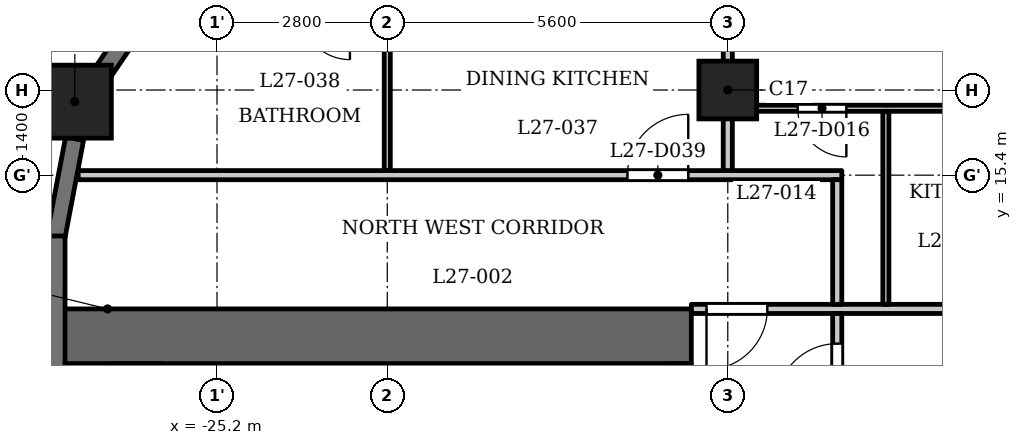
"""IFC4 building model, lengths in metres.
Left out: names, types, materials, properties, quantities, classifications, styles, units other than length and angle.
Written with IfcOpenShell. Run it as: python <this file> out.ifc"""

import sys

from ifc_helpers import new_model, si_unit, direction, frame, frame_2d, origin, origin_2d, place, context, subcontext, project, spatial, rectangle, extrude, element, fill, save


model = new_model("IFC4")
c1 = context("Model", 3, precision=1e-05, world=origin(), true_north=direction((0.0, 1.0)))
c2 = subcontext(c1, "Body", "Model", "MODEL_VIEW")
j1 = project(units=[si_unit("LENGTHUNIT", "METRE"), si_unit("PLANEANGLEUNIT", "RADIAN")], contexts=[c1])
p1 = place(None, origin())
s1 = spatial("IfcSite", under=j1, at=p1, CompositionType="ELEMENT")
p2 = place(p1, origin())
s2 = spatial("IfcBuilding", under=s1, at=p2, CompositionType="ELEMENT")
p3 = place(p2, frame((0.0, 0.0, 107.8)))
s3 = spatial("IfcBuildingStorey", under=s2, at=p3, CompositionType="ELEMENT", Elevation=107.8)
p4 = place(p3, frame((-27.538, 16.609, 0.0), z_axis=(0.0, 0.0, 1.0), x_axis=(1.0, 0.0, 0.0)))
e1 = element("IfcColumn", 1, at=p4, inside=s3, PredefinedType="COLUMN", context=c2, shape_type="SweptSolid", body=[
    extrude(rectangle(XDim=1.2, YDim=1.2, at=origin_2d()), origin(), (0.0, 0.0, 1.0), 3.5),
])
p5 = place(p3, frame((-16.8, 16.8, 0.0), z_axis=(0.0, 0.0, 1.0), x_axis=(1.0, 0.0, 0.0)))
e2 = element("IfcColumn", 2, at=p5, inside=s3, PredefinedType="COLUMN", context=c2, shape_type="SweptSolid", body=[
    extrude(rectangle(XDim=0.95, YDim=0.95, at=origin_2d()), origin(), (0.0, 0.0, 1.0), 3.5),
])
p6 = place(p3, frame((-26.561, 17.851, 0.0), z_axis=(0.0, 0.0, 1.0), x_axis=(-0.562173331661, -0.827019434577, 0.0)))
e3 = element("IfcWall", 3, at=p6, inside=s3, PredefinedType="SOLIDWALL", context=c2, shape_type="SweptSolid", body=[
    extrude(rectangle(XDim=0.977, YDim=0.3, at=frame_2d((0.489, 0.0))), origin(), (0.0, 0.0, 1.0), 3.2),
])
p7 = place(p3, frame((-27.542, 15.999, 0.0), z_axis=(0.0, 0.0, 1.0), x_axis=(-0.187349172861, -0.982293381546, 0.0)))
e4 = element("IfcWall", 4, at=p7, inside=s3, PredefinedType="SOLIDWALL", context=c2, shape_type="SweptSolid", body=[
    extrude(rectangle(XDim=1.656, YDim=0.3, at=frame_2d((0.828, 0.0))), origin(), (0.0, 0.0, 1.0), 2.4),
])
p8 = place(p3, frame((-27.85, 14.4, 0.0), z_axis=(0.0, 0.0, 1.0), x_axis=(0.0, -1.0, 0.0)))
e5 = element("IfcWall", 5, at=p8, inside=s3, PredefinedType="SOLIDWALL", context=c2, shape_type="SweptSolid", body=[
    extrude(rectangle(XDim=2.6, YDim=0.3, at=frame_2d((1.3, 0.0))), origin(), (0.0, 0.0, 1.0), 2.4),
])
p9 = place(p3, frame((-17.4, 12.75, 0.0), z_axis=(0.0, 0.0, 1.0), x_axis=(-1.0, 0.0, 0.0)))
e6 = element("IfcWall", 6, at=p9, inside=s3, PredefinedType="SHEAR", context=c2, shape_type="SweptSolid", body=[
    extrude(rectangle(XDim=10.4, YDim=0.9, at=frame_2d((5.2, 0.0))), origin(), (0.0, 0.0, 1.0), 3.2),
])
p10 = place(p3, frame((-17.6, -12.3, 0.0), z_axis=(0.0, 0.0, 1.0), x_axis=(0.0, 1.0, 0.0)))
e7 = element("IfcWall", 7, at=p10, inside=s3, PredefinedType="SHEAR", context=c2, shape_type="SweptSolid", body=[
    extrude(rectangle(XDim=24.6, YDim=0.4, at=frame_2d((12.3, 0.0))), origin(), (0.0, 0.0, 1.0), 3.2),
])
p11 = place(p10, frame((6.0, 0.0, 0.0)))
e8 = element("IfcOpeningElement", 8, at=p11, cuts=e7, PredefinedType="OPENING", context=c2, shape_type="SweptSolid", body=[
    extrude(rectangle(XDim=1.1, YDim=2.1, at=frame_2d((0.55, 1.05))), frame((0.0, 0.21, 0.0), z_axis=(0.0, -1.0, 0.0), x_axis=(1.0, 0.0, 0.0)), (0.0, 0.0, 1.0), 0.42),
])
p12 = place(p10, frame((8.4, 0.0, 0.0)))
e9 = element("IfcOpeningElement", 9, at=p12, cuts=e7, PredefinedType="OPENING", context=c2, shape_type="SweptSolid", body=[
    extrude(rectangle(XDim=1.1, YDim=2.1, at=frame_2d((0.55, 1.05))), frame((0.0, 0.21, 0.0), z_axis=(0.0, -1.0, 0.0), x_axis=(1.0, 0.0, 0.0)), (0.0, 0.0, 1.0), 0.42),
])
p13 = place(p10, frame((10.8, 0.0, 0.0)))
e10 = element("IfcOpeningElement", 10, at=p13, cuts=e7, PredefinedType="OPENING", context=c2, shape_type="SweptSolid", body=[
    extrude(rectangle(XDim=1.1, YDim=2.1, at=frame_2d((0.55, 1.05))), frame((0.0, 0.21, 0.0), z_axis=(0.0, -1.0, 0.0), x_axis=(1.0, 0.0, 0.0)), (0.0, 0.0, 1.0), 0.42),
])
p14 = place(p10, frame((16.75, 0.0, 0.0)))
e11 = element("IfcOpeningElement", 11, at=p14, cuts=e7, PredefinedType="OPENING", context=c2, shape_type="SweptSolid", body=[
    extrude(rectangle(XDim=0.9, YDim=2.1, at=frame_2d((0.45, 1.05))), frame((0.0, 0.21, 0.0), z_axis=(0.0, -1.0, 0.0), x_axis=(1.0, 0.0, 0.0)), (0.0, 0.0, 1.0), 0.42),
])
p15 = place(p10, frame((22.8, 0.0, 0.0)))
e12 = element("IfcOpeningElement", 12, at=p15, cuts=e7, PredefinedType="OPENING", context=c2, shape_type="SweptSolid", body=[
    extrude(rectangle(XDim=1.1, YDim=2.1, at=frame_2d((0.55, 1.05))), frame((0.0, 0.21, 0.0), z_axis=(0.0, -1.0, 0.0), x_axis=(1.0, 0.0, 0.0)), (0.0, 0.0, 1.0), 0.42),
])
p16 = place(p10, frame((0.7, 0.0, 0.0)))
e13 = element("IfcOpeningElement", 13, at=p16, cuts=e7, PredefinedType="OPENING", context=c2, shape_type="SweptSolid", body=[
    extrude(rectangle(XDim=1.1, YDim=2.1, at=frame_2d((0.55, 1.05))), frame((0.0, 0.21, 0.0), z_axis=(0.0, -1.0, 0.0), x_axis=(1.0, 0.0, 0.0)), (0.0, 0.0, 1.0), 0.42),
])
p17 = place(p10, frame((12.775, 0.0, 0.0)))
e14 = element("IfcOpeningElement", 14, at=p17, cuts=e7, PredefinedType="OPENING", context=c2, shape_type="SweptSolid", body=[
    extrude(rectangle(XDim=1.8, YDim=2.1, at=frame_2d((0.9, 1.05))), frame((0.0, 0.21, 0.0), z_axis=(0.0, -1.0, 0.0), x_axis=(1.0, 0.0, 0.0)), (0.0, 0.0, 1.0), 0.42),
])
p18 = place(p3, frame((-26.55, -12.3, 0.0), z_axis=(0.0, 0.0, 1.0), x_axis=(0.0, 1.0, 0.0)))
e15 = element("IfcWall", 15, at=p18, inside=s3, PredefinedType="SHEAR", context=c2, shape_type="SweptSolid", body=[
    extrude(rectangle(XDim=24.6, YDim=0.9, at=frame_2d((12.3, 0.0))), origin(), (0.0, 0.0, 1.0), 3.2),
])
p19 = place(p3, frame((-23.55, 9.8, 0.0), z_axis=(0.0, 0.0, 1.0), x_axis=(0.0, 1.0, 0.0)))
e16 = element("IfcWall", 16, at=p19, inside=s3, PredefinedType="PARTITIONING", context=c2, shape_type="SweptSolid", body=[
    extrude(rectangle(XDim=2.5, YDim=0.2, at=frame_2d((1.25, 0.0))), origin(), (0.0, 0.0, 1.0), 3.2),
])
p20 = place(p19, frame((0.8, 0.0, 0.0)))
e17 = element("IfcOpeningElement", 17, at=p20, cuts=e16, PredefinedType="OPENING", context=c2, shape_type="SweptSolid", body=[
    extrude(rectangle(XDim=0.9, YDim=2.1, at=frame_2d((0.45, 1.05))), frame((0.0, 0.11, 0.0), z_axis=(0.0, -1.0, 0.0), x_axis=(1.0, 0.0, 0.0)), (0.0, 0.0, 1.0), 0.22),
])
p21 = place(p3, frame((-17.4, 13.2, 0.0), z_axis=(0.0, 0.0, 1.0), x_axis=(1.0, 0.0, 0.0)))
e18 = element("IfcWall", 18, at=p21, inside=s3, PredefinedType="PARTITIONING", context=c2, shape_type="SweptSolid", body=[
    extrude(rectangle(XDim=34.8, YDim=0.15, at=frame_2d((17.4, 0.0))), origin(), (0.0, 0.0, 1.0), 3.2),
])
p22 = place(p21, frame((0.25, 0.0, 0.0)))
e19 = element("IfcOpeningElement", 19, at=p22, cuts=e18, PredefinedType="OPENING", context=c2, shape_type="SweptSolid", body=[
    extrude(rectangle(XDim=1.0, YDim=2.1, at=frame_2d((0.5, 1.05))), frame((0.0, 0.085, 0.0), z_axis=(0.0, -1.0, 0.0), x_axis=(1.0, 0.0, 0.0)), (0.0, 0.0, 1.0), 0.17),
])
p23 = place(p21, frame((33.65, 0.0, 0.0)))
e20 = element("IfcOpeningElement", 20, at=p23, cuts=e18, PredefinedType="OPENING", context=c2, shape_type="SweptSolid", body=[
    extrude(rectangle(XDim=1.0, YDim=2.1, at=frame_2d((0.5, 1.05))), frame((0.0, 0.085, 0.0), z_axis=(0.0, -1.0, 0.0), x_axis=(1.0, 0.0, 0.0)), (0.0, 0.0, 1.0), 0.17),
])
p24 = place(p21, frame((4.55, 0.0, 0.0)))
e21 = element("IfcOpeningElement", 21, at=p24, cuts=e18, PredefinedType="OPENING", context=c2, shape_type="SweptSolid", body=[
    extrude(rectangle(XDim=1.0, YDim=2.1, at=frame_2d((0.5, 1.05))), frame((0.0, 0.085, 0.0), z_axis=(0.0, -1.0, 0.0), x_axis=(1.0, 0.0, 0.0)), (0.0, 0.0, 1.0), 0.17),
])
p25 = place(p21, frame((6.85, 0.0, 0.0)))
e22 = element("IfcOpeningElement", 22, at=p25, cuts=e18, PredefinedType="OPENING", context=c2, shape_type="SweptSolid", body=[
    extrude(rectangle(XDim=1.0, YDim=2.1, at=frame_2d((0.5, 1.05))), frame((0.0, 0.085, 0.0), z_axis=(0.0, -1.0, 0.0), x_axis=(1.0, 0.0, 0.0)), (0.0, 0.0, 1.0), 0.17),
])
p26 = place(p21, frame((12.5, 0.0, 0.0)))
e23 = element("IfcOpeningElement", 23, at=p26, cuts=e18, PredefinedType="OPENING", context=c2, shape_type="SweptSolid", body=[
    extrude(rectangle(XDim=1.0, YDim=2.1, at=frame_2d((0.5, 1.05))), frame((0.0, 0.085, 0.0), z_axis=(0.0, -1.0, 0.0), x_axis=(1.0, 0.0, 0.0)), (0.0, 0.0, 1.0), 0.17),
])
p27 = place(p21, frame((25.7, 0.0, 0.0)))
e24 = element("IfcOpeningElement", 24, at=p27, cuts=e18, PredefinedType="OPENING", context=c2, shape_type="SweptSolid", body=[
    extrude(rectangle(XDim=1.0, YDim=2.1, at=frame_2d((0.5, 1.05))), frame((0.0, 0.085, 0.0), z_axis=(0.0, -1.0, 0.0), x_axis=(1.0, 0.0, 0.0)), (0.0, 0.0, 1.0), 0.17),
])
p28 = place(p21, frame((29.75, 0.0, 0.0)))
e25 = element("IfcOpeningElement", 25, at=p28, cuts=e18, PredefinedType="OPENING", context=c2, shape_type="SweptSolid", body=[
    extrude(rectangle(XDim=1.0, YDim=2.1, at=frame_2d((0.5, 1.05))), frame((0.0, 0.085, 0.0), z_axis=(0.0, -1.0, 0.0), x_axis=(1.0, 0.0, 0.0)), (0.0, 0.0, 1.0), 0.17),
])
p29 = place(p3, frame((-27.484, 15.4, 0.0), z_axis=(0.0, 0.0, 1.0), x_axis=(1.0, 0.0, 0.0)))
e26 = element("IfcWall", 26, at=p29, inside=s3, PredefinedType="PARTITIONING", context=c2, shape_type="SweptSolid", body=[
    extrude(rectangle(XDim=12.559, YDim=0.15, at=frame_2d((6.279, 0.0))), origin(), (0.0, 0.0, 1.0), 3.2),
])
p30 = place(p29, frame((9.034, 0.0, 0.0)))
e27 = element("IfcOpeningElement", 27, at=p30, cuts=e26, PredefinedType="OPENING", context=c2, shape_type="SweptSolid", body=[
    extrude(rectangle(XDim=1.0, YDim=2.1, at=frame_2d((0.5, 1.05))), frame((0.0, 0.085, 0.0), z_axis=(0.0, -1.0, 0.0), x_axis=(1.0, 0.0, 0.0)), (0.0, 0.0, 1.0), 0.17),
])
p31 = place(p3, frame((-16.725, 16.5, 0.0), z_axis=(0.0, 0.0, 1.0), x_axis=(1.0, 0.0, 0.0)))
e28 = element("IfcWall", 28, at=p31, inside=s3, PredefinedType="PARTITIONING", context=c2, shape_type="SweptSolid", body=[
    extrude(rectangle(XDim=33.45, YDim=0.1, at=frame_2d((16.725, 0.0))), origin(), (0.0, 0.0, 1.0), 3.2),
])
p32 = place(p31, frame((1.075, 0.0, 0.0)))
e29 = element("IfcOpeningElement", 29, at=p32, cuts=e28, PredefinedType="OPENING", context=c2, shape_type="SweptSolid", body=[
    extrude(rectangle(XDim=0.8, YDim=2.1, at=frame_2d((0.4, 1.05))), frame((0.0, 0.06, 0.0), z_axis=(0.0, -1.0, 0.0), x_axis=(1.0, 0.0, 0.0)), (0.0, 0.0, 1.0), 0.12),
])
p33 = place(p31, frame((3.975, 0.0, 0.0)))
e30 = element("IfcOpeningElement", 30, at=p33, cuts=e28, PredefinedType="OPENING", context=c2, shape_type="SweptSolid", body=[
    extrude(rectangle(XDim=0.9, YDim=2.1, at=frame_2d((0.45, 1.05))), frame((0.0, 0.06, 0.0), z_axis=(0.0, -1.0, 0.0), x_axis=(1.0, 0.0, 0.0)), (0.0, 0.0, 1.0), 0.12),
])
p34 = place(p31, frame((8.975, 0.0, 0.0)))
e31 = element("IfcOpeningElement", 31, at=p34, cuts=e28, PredefinedType="OPENING", context=c2, shape_type="SweptSolid", body=[
    extrude(rectangle(XDim=0.8, YDim=2.1, at=frame_2d((0.4, 1.05))), frame((0.0, 0.06, 0.0), z_axis=(0.0, -1.0, 0.0), x_axis=(1.0, 0.0, 0.0)), (0.0, 0.0, 1.0), 0.12),
])
p35 = place(p31, frame((6.325, 0.0, 0.0)))
e32 = element("IfcOpeningElement", 32, at=p35, cuts=e28, PredefinedType="OPENING", context=c2, shape_type="SweptSolid", body=[
    extrude(rectangle(XDim=0.9, YDim=2.1, at=frame_2d((0.45, 1.05))), frame((0.0, 0.06, 0.0), z_axis=(0.0, -1.0, 0.0), x_axis=(1.0, 0.0, 0.0)), (0.0, 0.0, 1.0), 0.12),
])
p36 = place(p31, frame((20.725, 0.0, 0.0)))
e33 = element("IfcOpeningElement", 33, at=p36, cuts=e28, PredefinedType="OPENING", context=c2, shape_type="SweptSolid", body=[
    extrude(rectangle(XDim=0.8, YDim=2.1, at=frame_2d((0.4, 1.05))), frame((0.0, 0.06, 0.0), z_axis=(0.0, -1.0, 0.0), x_axis=(1.0, 0.0, 0.0)), (0.0, 0.0, 1.0), 0.12),
])
p37 = place(p31, frame((17.775, 0.0, 0.0)))
e34 = element("IfcOpeningElement", 34, at=p37, cuts=e28, PredefinedType="OPENING", context=c2, shape_type="SweptSolid", body=[
    extrude(rectangle(XDim=0.9, YDim=2.1, at=frame_2d((0.45, 1.05))), frame((0.0, 0.06, 0.0), z_axis=(0.0, -1.0, 0.0), x_axis=(1.0, 0.0, 0.0)), (0.0, 0.0, 1.0), 0.12),
])
p38 = place(p31, frame((11.825, 0.0, 0.0)))
e35 = element("IfcOpeningElement", 35, at=p38, cuts=e28, PredefinedType="OPENING", context=c2, shape_type="SweptSolid", body=[
    extrude(rectangle(XDim=0.9, YDim=2.1, at=frame_2d((0.45, 1.05))), frame((0.0, 0.06, 0.0), z_axis=(0.0, -1.0, 0.0), x_axis=(1.0, 0.0, 0.0)), (0.0, 0.0, 1.0), 0.12),
])
p39 = place(p31, frame((15.175, 0.0, 0.0)))
e36 = element("IfcOpeningElement", 36, at=p39, cuts=e28, PredefinedType="OPENING", context=c2, shape_type="SweptSolid", body=[
    extrude(rectangle(XDim=0.9, YDim=2.1, at=frame_2d((0.45, 1.05))), frame((0.0, 0.06, 0.0), z_axis=(0.0, -1.0, 0.0), x_axis=(1.0, 0.0, 0.0)), (0.0, 0.0, 1.0), 0.12),
])
p40 = place(p31, frame((22.975, 0.0, 0.0)))
e37 = element("IfcOpeningElement", 37, at=p40, cuts=e28, PredefinedType="OPENING", context=c2, shape_type="SweptSolid", body=[
    extrude(rectangle(XDim=0.8, YDim=2.1, at=frame_2d((0.4, 1.05))), frame((0.0, 0.06, 0.0), z_axis=(0.0, -1.0, 0.0), x_axis=(1.0, 0.0, 0.0)), (0.0, 0.0, 1.0), 0.12),
])
p41 = place(p31, frame((24.875, 0.0, 0.0)))
e38 = element("IfcOpeningElement", 38, at=p41, cuts=e28, PredefinedType="OPENING", context=c2, shape_type="SweptSolid", body=[
    extrude(rectangle(XDim=0.9, YDim=2.1, at=frame_2d((0.45, 1.05))), frame((0.0, 0.06, 0.0), z_axis=(0.0, -1.0, 0.0), x_axis=(1.0, 0.0, 0.0)), (0.0, 0.0, 1.0), 0.12),
])
p42 = place(p31, frame((32.075, 0.0, 0.0)))
e39 = element("IfcOpeningElement", 39, at=p42, cuts=e28, PredefinedType="OPENING", context=c2, shape_type="SweptSolid", body=[
    extrude(rectangle(XDim=0.8, YDim=2.1, at=frame_2d((0.4, 1.05))), frame((0.0, 0.06, 0.0), z_axis=(0.0, -1.0, 0.0), x_axis=(1.0, 0.0, 0.0)), (0.0, 0.0, 1.0), 0.12),
])
p43 = place(p31, frame((29.175, 0.0, 0.0)))
e40 = element("IfcOpeningElement", 40, at=p43, cuts=e28, PredefinedType="OPENING", context=c2, shape_type="SweptSolid", body=[
    extrude(rectangle(XDim=0.9, YDim=2.1, at=frame_2d((0.45, 1.05))), frame((0.0, 0.06, 0.0), z_axis=(0.0, -1.0, 0.0), x_axis=(1.0, 0.0, 0.0)), (0.0, 0.0, 1.0), 0.12),
])
p44 = place(p3, frame((-22.4, 15.475, 0.0), z_axis=(0.0, 0.0, 1.0), x_axis=(0.0, 1.0, 0.0)))
e41 = element("IfcWall", 41, at=p44, inside=s3, PredefinedType="PARTITIONING", context=c2, shape_type="SweptSolid", body=[
    extrude(rectangle(XDim=2.575, YDim=0.1, at=frame_2d((1.288, 0.0))), origin(), (0.0, 0.0, 1.0), 3.2),
])
p45 = place(p3, frame((-16.8, 15.475, 0.0), z_axis=(0.0, 0.0, 1.0), x_axis=(0.0, 1.0, 0.0)))
e42 = element("IfcWall", 42, at=p45, inside=s3, PredefinedType="PARTITIONING", context=c2, shape_type="SweptSolid", body=[
    extrude(rectangle(XDim=7.505, YDim=0.15, at=frame_2d((3.752, 0.0))), origin(), (0.0, 0.0, 1.0), 3.2),
])
p46 = place(p3, frame((-15.0, 6.769, 0.0), z_axis=(0.0, 0.0, 1.0), x_axis=(0.0, 1.0, 0.0)))
e43 = element("IfcWall", 43, at=p46, inside=s3, PredefinedType="PARTITIONING", context=c2, shape_type="SweptSolid", body=[
    extrude(rectangle(XDim=6.356, YDim=0.15, at=frame_2d((3.178, 0.0))), origin(), (0.0, 0.0, 1.0), 3.2),
])
p47 = place(p46, frame((4.86, 0.0, 0.0)))
e44 = element("IfcOpeningElement", 44, at=p47, cuts=e43, PredefinedType="OPENING", context=c2, shape_type="SweptSolid", body=[
    extrude(rectangle(XDim=1.0, YDim=2.1, at=frame_2d((0.5, 1.05))), frame((0.0, 0.085, 0.0), z_axis=(0.0, -1.0, 0.0), x_axis=(1.0, 0.0, 0.0)), (0.0, 0.0, 1.0), 0.17),
])
p48 = place(p3, frame((-15.0, 13.275, 0.0), z_axis=(0.0, 0.0, 1.0), x_axis=(0.0, 1.0, 0.0)))
e45 = element("IfcWall", 45, at=p48, inside=s3, PredefinedType="PARTITIONING", context=c2, shape_type="SweptSolid", body=[
    extrude(rectangle(XDim=2.05, YDim=0.15, at=frame_2d((1.025, 0.0))), origin(), (0.0, 0.0, 1.0), 3.2),
])
p49 = place(p3, frame((-14.2, 13.275, 0.0), z_axis=(0.0, 0.0, 1.0), x_axis=(0.0, 1.0, 0.0)))
e46 = element("IfcWall", 46, at=p49, inside=s3, PredefinedType="PARTITIONING", context=c2, shape_type="SweptSolid", body=[
    extrude(rectangle(XDim=3.175, YDim=0.1, at=frame_2d((1.587, 0.0))), origin(), (0.0, 0.0, 1.0), 3.2),
])
p50 = place(p47, origin())
e47 = element("IfcDoor", 47, at=p50, inside=s3, OperationType="SINGLE_SWING_RIGHT", PredefinedType="DOOR", context=c2, shape_type="SweptSolid", body=[
    extrude(rectangle(XDim=1.0, YDim=2.1, at=frame_2d((0.5, 1.05))), frame((0.0, 0.025, 0.0), z_axis=(0.0, -1.0, 0.0), x_axis=(1.0, 0.0, 0.0)), (0.0, 0.0, 1.0), 0.05),
])
fill(e44, e47)
p51 = place(p22, origin())
e48 = element("IfcDoor", 48, at=p51, inside=s3, OperationType="SINGLE_SWING_LEFT", PredefinedType="DOOR", context=c2, shape_type="SweptSolid", body=[
    extrude(rectangle(XDim=1.0, YDim=2.1, at=frame_2d((0.5, 1.05))), frame((0.0, 0.025, 0.0), z_axis=(0.0, -1.0, 0.0), x_axis=(1.0, 0.0, 0.0)), (0.0, 0.0, 1.0), 0.05),
])
fill(e19, e48)
p52 = place(p32, origin())
e49 = element("IfcDoor", 49, at=p52, inside=s3, OperationType="SINGLE_SWING_RIGHT", PredefinedType="DOOR", context=c2, shape_type="SweptSolid", body=[
    extrude(rectangle(XDim=0.8, YDim=2.1, at=frame_2d((0.4, 1.05))), frame((0.0, 0.025, 0.0), z_axis=(0.0, -1.0, 0.0), x_axis=(1.0, 0.0, 0.0)), (0.0, 0.0, 1.0), 0.05),
])
fill(e29, e49)
p53 = place(p30, origin())
e50 = element("IfcDoor", 50, at=p53, inside=s3, OperationType="SINGLE_SWING_LEFT", PredefinedType="DOOR", context=c2, shape_type="SweptSolid", body=[
    extrude(rectangle(XDim=1.0, YDim=2.1, at=frame_2d((0.5, 1.05))), frame((0.0, 0.025, 0.0), z_axis=(0.0, -1.0, 0.0), x_axis=(1.0, 0.0, 0.0)), (0.0, 0.0, 1.0), 0.05),
])
fill(e27, e50)
save(model, sys.argv[1])
